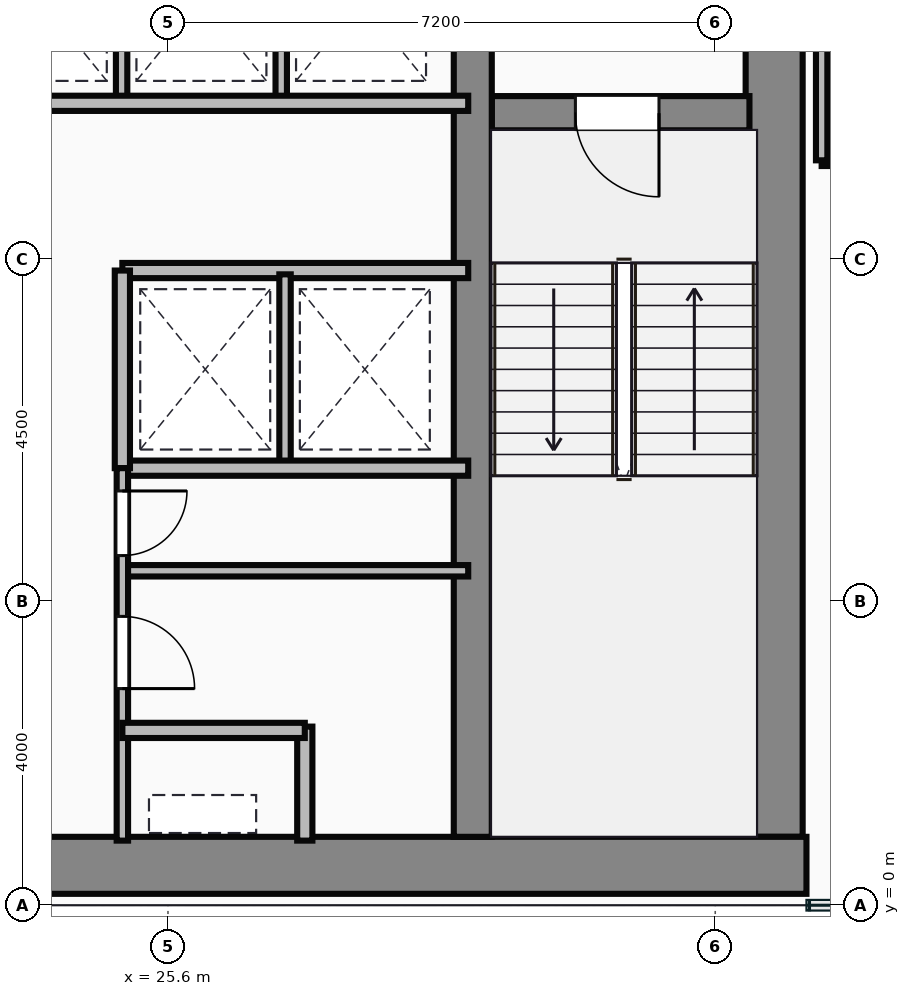
"""IFC4 building model, lengths in metres.
Left out: names, types, materials, properties, quantities, classifications, styles, units other than length and angle.
Written with IfcOpenShell. Run it as: python <this file> out.ifc"""

import sys

from ifc_helpers import new_model, si_unit, direction, frame, frame_2d, origin, place, context, subcontext, project, spatial, rectangle, extrude, source, transform, mapped, element, fill, save


model = new_model("IFC4")
c1 = context("Model", 3, precision=1e-05, world=origin(), true_north=direction((0.0, 1.0)))
c2 = subcontext(c1, "Body", "Model", "MODEL_VIEW")
j1 = project(units=[si_unit("LENGTHUNIT", "METRE"), si_unit("PLANEANGLEUNIT", "RADIAN")], contexts=[c1])
p1 = place(None, origin())
s1 = spatial("IfcSite", under=j1, at=p1, CompositionType="ELEMENT")
p2 = place(p1, origin())
s2 = spatial("IfcBuilding", under=s1, at=p2, CompositionType="ELEMENT")
p3 = place(p2, frame((0.0, 0.0, 106.9)))
s3 = spatial("IfcBuildingStorey", under=s2, at=p3, CompositionType="ELEMENT", Elevation=106.9)
m1 = source(origin(), c2, "Body", "SweptSolid", [
    extrude(rectangle(XDim=29.5, YDim=0.75, at=frame_2d((14.75, 0.0))), origin(), (0.0, 0.0, 1.0), 3.65),
])
p4 = place(p3, frame((4.5, 0.525, 0.0), z_axis=(0.0, 0.0, 1.0), x_axis=(1.0, 0.0, 0.0)))
e1 = element("IfcWall", 1, at=p4, inside=s3, PredefinedType="SHEAR", context=c2, shape_type="MappedRepresentation", body=[
    mapped(m1, transform((0.0, 0.0, 0.0))),
])
m2 = source(origin(), c2, "Body", "SweptSolid", [
    extrude(rectangle(XDim=13.1, YDim=0.75, at=frame_2d((6.55, 0.0))), origin(), (0.0, 0.0, 1.0), 3.65),
])
p5 = place(p3, frame((33.575, 0.9, 0.0), z_axis=(0.0, 0.0, 1.0), x_axis=(0.0, 1.0, 0.0)))
e2 = element("IfcWall", 2, at=p5, inside=s3, PredefinedType="SHEAR", context=c2, shape_type="MappedRepresentation", body=[
    mapped(m2, transform((0.0, 0.0, 0.0))),
])
m3 = source(origin(), c2, "Body", "SweptSolid", [
    extrude(rectangle(XDim=12.35, YDim=0.5, at=frame_2d((6.175, 0.0))), origin(), (0.0, 0.0, 1.0), 3.65),
])
p6 = place(p3, frame((29.61, 0.9, 0.0), z_axis=(0.0, 0.0, 1.0), x_axis=(0.0, 1.0, 0.0)))
e3 = element("IfcWall", 3, at=p6, inside=s3, PredefinedType="SHEAR", context=c2, shape_type="MappedRepresentation", body=[
    mapped(m3, transform((0.0, 0.0, 0.0))),
])
m4 = source(origin(), c2, "Body", "SweptSolid", [
    extrude(rectangle(XDim=3.39, YDim=0.45, at=frame_2d((1.695, 0.0))), origin(), (0.0, 0.0, 1.0), 3.65),
])
p7 = place(p3, frame((29.86, 10.42, 0.0), z_axis=(0.0, 0.0, 1.0), x_axis=(1.0, 0.0, 0.0)))
e4 = element("IfcWall", 4, at=p7, inside=s3, PredefinedType="SHEAR", context=c2, shape_type="MappedRepresentation", body=[
    mapped(m4, transform((0.0, 0.0, 0.0))),
])
p8 = place(p7, frame((1.1, 0.0, 0.0)))
e5 = element("IfcOpeningElement", 5, at=p8, cuts=e4, PredefinedType="OPENING", context=c2, shape_type="SweptSolid", body=[
    extrude(rectangle(XDim=1.1, YDim=2.15, at=frame_2d((0.55, 1.075))), frame((0.0, 0.235, 0.0), z_axis=(0.0, -1.0, 0.0), x_axis=(1.0, 0.0, 0.0)), (0.0, 0.0, 1.0), 0.47),
])
m5 = source(origin(), c2, "Body", "SweptSolid", [
    extrude(rectangle(XDim=8.8, YDim=0.2, at=frame_2d((4.4, 0.0))), origin(), (0.0, 0.0, 1.0), 3.4),
])
p9 = place(p3, frame((20.75, 10.55, 0.0), z_axis=(0.0, 0.0, 1.0), x_axis=(1.0, 0.0, 0.0)))
e6 = element("IfcWall", 6, at=p9, inside=s3, PredefinedType="PARTITIONING", context=c2, shape_type="MappedRepresentation", body=[
    mapped(m5, transform((0.0, 0.0, 0.0))),
])
m6 = source(origin(), c2, "Body", "SweptSolid", [
    extrude(rectangle(XDim=2.85, YDim=0.15, at=frame_2d((1.425, 0.0))), origin(), (0.0, 0.0, 1.0), 3.4),
])
for number, where, z_axis, x_axis in (
    (7, (24.99, 10.6, 0.0), (0.0, 0.0, 1.0), (0.0, 1.0, 0.0)),
    (8, (27.09, 10.6, 0.0), (0.0, 0.0, 1.0), (0.0, 1.0, 0.0)),
):
    element("IfcWall", number, at=place(p3, frame(where, z_axis=z_axis, x_axis=x_axis)), inside=s3, PredefinedType="PARTITIONING", context=c2, shape_type="MappedRepresentation", body=[
        mapped(m6, transform((0.0, 0.0, 0.0))),
    ])
m7 = source(origin(), c2, "Body", "SweptSolid", [
    extrude(rectangle(XDim=4.55, YDim=0.2, at=frame_2d((2.275, 0.0))), origin(), (0.0, 0.0, 1.0), 3.4),
])
for number, where, z_axis, x_axis in (
    (9, (25.0, 8.35, 0.0), (0.0, 0.0, 1.0), (1.0, 0.0, 0.0)),
    (10, (25.0, 5.75, 0.0), (0.0, 0.0, 1.0), (1.0, 0.0, 0.0)),
):
    element("IfcWall", number, at=place(p3, frame(where, z_axis=z_axis, x_axis=x_axis)), inside=s3, PredefinedType="PARTITIONING", context=c2, shape_type="MappedRepresentation", body=[
        mapped(m7, transform((0.0, 0.0, 0.0))),
    ])
m8 = source(origin(), c2, "Body", "SweptSolid", [
    extrude(rectangle(XDim=2.6, YDim=0.2, at=frame_2d((1.3, 0.0))), origin(), (0.0, 0.0, 1.0), 3.4),
])
p10 = place(p3, frame((25.0, 5.75, 0.0), z_axis=(0.0, 0.0, 1.0), x_axis=(0.0, 1.0, 0.0)))
e11 = element("IfcWall", 11, at=p10, inside=s3, PredefinedType="PARTITIONING", context=c2, shape_type="MappedRepresentation", body=[
    mapped(m8, transform((0.0, 0.0, 0.0))),
])
m9 = source(origin(), c2, "Body", "SweptSolid", [
    extrude(rectangle(XDim=2.5, YDim=0.15, at=frame_2d((1.25, 0.0))), origin(), (0.0, 0.0, 1.0), 3.4),
])
p11 = place(p3, frame((27.14, 5.8, 0.0), z_axis=(0.0, 0.0, 1.0), x_axis=(0.0, 1.0, 0.0)))
e12 = element("IfcWall", 12, at=p11, inside=s3, PredefinedType="PARTITIONING", context=c2, shape_type="MappedRepresentation", body=[
    mapped(m9, transform((0.0, 0.0, 0.0))),
])
m10 = source(origin(), c2, "Body", "SweptSolid", [
    extrude(rectangle(XDim=4.9, YDim=0.15, at=frame_2d((2.45, 0.0))), origin(), (0.0, 0.0, 1.0), 3.4),
])
p12 = place(p3, frame((25.0, 0.85, 0.0), z_axis=(0.0, 0.0, 1.0), x_axis=(0.0, 1.0, 0.0)))
e13 = element("IfcWall", 13, at=p12, inside=s3, PredefinedType="PARTITIONING", context=c2, shape_type="MappedRepresentation", body=[
    mapped(m10, transform((0.0, 0.0, 0.0))),
])
p13 = place(p12, frame((2.0, 0.0, 0.0)))
e14 = element("IfcOpeningElement", 14, at=p13, cuts=e13, PredefinedType="OPENING", context=c2, shape_type="SweptSolid", body=[
    extrude(rectangle(XDim=0.95, YDim=2.15, at=frame_2d((0.475, 1.075))), frame((0.0, 0.085, 0.0), z_axis=(0.0, -1.0, 0.0), x_axis=(1.0, 0.0, 0.0)), (0.0, 0.0, 1.0), 0.17),
])
p14 = place(p12, frame((3.75, 0.0, 0.0)))
e15 = element("IfcOpeningElement", 15, at=p14, cuts=e13, PredefinedType="OPENING", context=c2, shape_type="SweptSolid", body=[
    extrude(rectangle(XDim=0.85, YDim=2.15, at=frame_2d((0.425, 1.075))), frame((0.0, 0.085, 0.0), z_axis=(0.0, -1.0, 0.0), x_axis=(1.0, 0.0, 0.0)), (0.0, 0.0, 1.0), 0.17),
])
m11 = source(origin(), c2, "Body", "SweptSolid", [
    extrude(rectangle(XDim=2.4, YDim=0.2, at=frame_2d((1.2, 0.0))), origin(), (0.0, 0.0, 1.0), 3.4),
])
p15 = place(p3, frame((25.0, 2.3, 0.0), z_axis=(0.0, 0.0, 1.0), x_axis=(1.0, 0.0, 0.0)))
e16 = element("IfcWall", 16, at=p15, inside=s3, PredefinedType="PARTITIONING", context=c2, shape_type="MappedRepresentation", body=[
    mapped(m11, transform((0.0, 0.0, 0.0))),
])
m12 = source(origin(), c2, "Body", "SweptSolid", [
    extrude(rectangle(XDim=1.5, YDim=0.2, at=frame_2d((0.75, 0.0))), origin(), (0.0, 0.0, 1.0), 3.4),
])
p16 = place(p3, frame((27.4, 0.85, 0.0), z_axis=(0.0, 0.0, 1.0), x_axis=(0.0, 1.0, 0.0)))
e17 = element("IfcWall", 17, at=p16, inside=s3, PredefinedType="PARTITIONING", context=c2, shape_type="MappedRepresentation", body=[
    mapped(m12, transform((0.0, 0.0, 0.0))),
])
m13 = source(origin(), c2, "Body", "SweptSolid", [
    extrude(rectangle(XDim=4.55, YDim=0.15, at=frame_2d((2.275, 0.0))), origin(), (0.0, 0.0, 1.0), 3.4),
])
p17 = place(p3, frame((25.0, 4.4, 0.0), z_axis=(0.0, 0.0, 1.0), x_axis=(1.0, 0.0, 0.0)))
e18 = element("IfcWall", 18, at=p17, inside=s3, PredefinedType="PARTITIONING", context=c2, shape_type="MappedRepresentation", body=[
    mapped(m13, transform((0.0, 0.0, 0.0))),
])
m14 = source(origin(), c2, "Body", "SweptSolid", [
    extrude(rectangle(XDim=4.8, YDim=0.15, at=frame_2d((2.4, 0.0))), origin(), (0.0, 0.0, 1.0), 3.4),
])
p18 = place(p3, frame((34.2, 9.8, 0.0), z_axis=(0.0, 0.0, 1.0), x_axis=(1.0, 0.0, 0.0)))
e19 = element("IfcWall", 19, at=p18, inside=s3, PredefinedType="PARTITIONING", context=c2, shape_type="MappedRepresentation", body=[
    mapped(m14, transform((0.0, 0.0, 0.0))),
])
m15 = source(origin(), c2, "Body", "SweptSolid", [
    extrude(rectangle(XDim=4.18, YDim=0.15, at=frame_2d((2.09, 0.0))), origin(), (0.0, 0.0, 1.0), 3.4),
])
p19 = place(p3, frame((34.2, 9.8, 0.0), z_axis=(0.0, 0.0, 1.0), x_axis=(0.0, 1.0, 0.0)))
e20 = element("IfcWall", 20, at=p19, inside=s3, PredefinedType="PARTITIONING", context=c2, shape_type="MappedRepresentation", body=[
    mapped(m15, transform((0.0, 0.0, 0.0))),
])
m16 = source(origin(), c2, "Body", "SweptSolid", [
    extrude(rectangle(XDim=1.1, YDim=2.15, at=frame_2d((0.55, 1.075))), frame((0.0, 0.025, 0.0), z_axis=(0.0, -1.0, 0.0), x_axis=(1.0, 0.0, 0.0)), (0.0, 0.0, 1.0), 0.05),
])
p20 = place(p8, frame((1.1, 0.0, 0.0), z_axis=(0.0, 0.0, 1.0), x_axis=(-1.0, 0.0, 0.0)))
e21 = element("IfcDoor", 21, at=p20, inside=s3, OperationType="SINGLE_SWING_RIGHT", PredefinedType="DOOR", context=c2, shape_type="MappedRepresentation", body=[
    mapped(m16, transform((0.0, 0.0, 0.0))),
])
fill(e5, e21)
m17 = source(origin(), c2, "Body", "SweptSolid", [
    extrude(rectangle(XDim=0.95, YDim=2.15, at=frame_2d((0.475, 1.075))), frame((0.0, 0.025, 0.0), z_axis=(0.0, -1.0, 0.0), x_axis=(1.0, 0.0, 0.0)), (0.0, 0.0, 1.0), 0.05),
])
p21 = place(p13, origin())
e22 = element("IfcDoor", 22, at=p21, inside=s3, OperationType="SINGLE_SWING_LEFT", PredefinedType="DOOR", context=c2, shape_type="MappedRepresentation", body=[
    mapped(m17, transform((0.0, 0.0, 0.0))),
])
fill(e14, e22)
m18 = source(origin(), c2, "Body", "SweptSolid", [
    extrude(rectangle(XDim=0.85, YDim=2.15, at=frame_2d((0.425, 1.075))), frame((0.0, 0.025, 0.0), z_axis=(0.0, -1.0, 0.0), x_axis=(1.0, 0.0, 0.0)), (0.0, 0.0, 1.0), 0.05),
])
p22 = place(p14, origin())
e23 = element("IfcDoor", 23, at=p22, inside=s3, OperationType="SINGLE_SWING_RIGHT", PredefinedType="DOOR", context=c2, shape_type="MappedRepresentation", body=[
    mapped(m18, transform((0.0, 0.0, 0.0))),
])
fill(e15, e23)
save(model, sys.argv[1])
